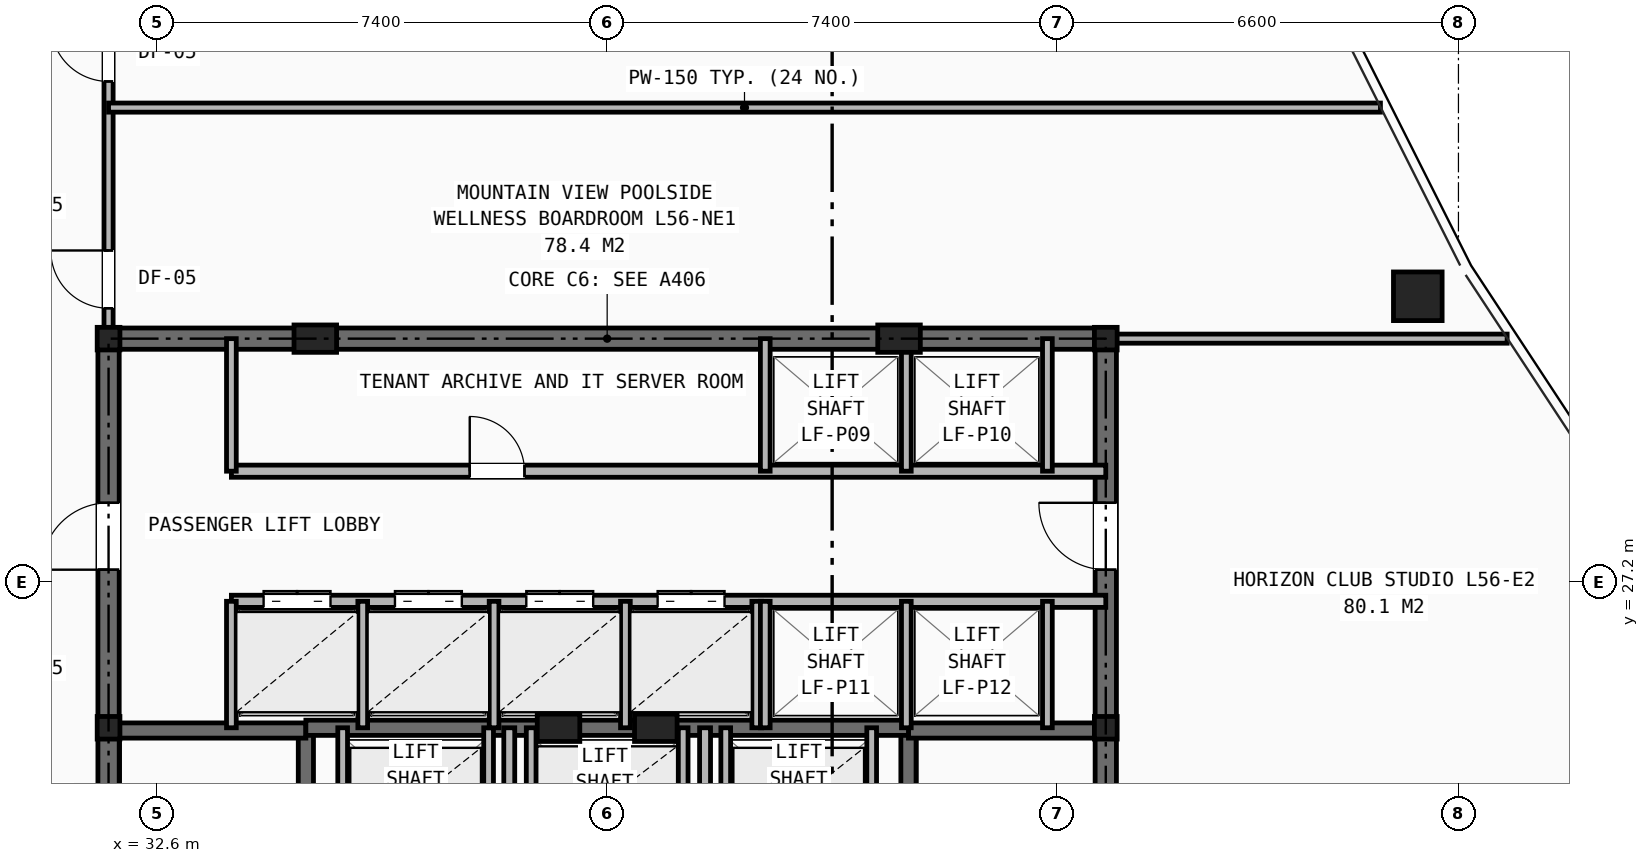
"""IFC4 building model, lengths in metres.
Left out: names, types, materials, properties, quantities, classifications, styles, units other than length and angle.
Written with IfcOpenShell. Run it as: python <this file> out.ifc"""

import sys

from ifc_helpers import new_model, si_unit, direction, frame, frame_2d, origin, origin_2d, place, context, subcontext, project, spatial, rectangle, hollow_rectangle, i_section, extrude, element, fill, save


model = new_model("IFC4")
c1 = context("Model", 3, precision=1e-05, world=origin(), true_north=direction((0.0, 1.0)))
c2 = subcontext(c1, "Body", "Model", "MODEL_VIEW")
j1 = project(units=[si_unit("LENGTHUNIT", "METRE"), si_unit("PLANEANGLEUNIT", "RADIAN")], contexts=[c1])
p1 = place(None, origin())
s1 = spatial("IfcSite", under=j1, at=p1, CompositionType="ELEMENT")
p2 = place(p1, origin())
s2 = spatial("IfcBuilding", under=s1, at=p2, CompositionType="ELEMENT")
p3 = place(p2, frame((0.0, 0.0, 196.5)))
s3 = spatial("IfcBuildingStorey", under=s2, at=p3, CompositionType="ELEMENT", Elevation=196.5)
for number, where, z_axis, x_axis in (
    (1, (31.8, 24.8, 0.0), (0.0, 0.0, 1.0), (1.0, 0.0, 0.0)),
    (2, (48.2, 24.8, 0.0), (0.0, 0.0, 1.0), (1.0, 0.0, 0.0)),
    (3, (31.8, 31.2, 0.0), (0.0, 0.0, 1.0), (1.0, 0.0, 0.0)),
    (4, (48.2, 31.2, 0.0), (0.0, 0.0, 1.0), (1.0, 0.0, 0.0)),
):
    element("IfcColumn", number, at=place(p3, frame(where, z_axis=z_axis, x_axis=x_axis)), inside=s3, PredefinedType="COLUMN", context=c2, shape_type="SweptSolid", body=[
        extrude(i_section(OverallWidth=0.374, OverallDepth=0.372, WebThickness=0.016, FlangeThickness=0.026, at=origin_2d()), origin(), (0.0, 0.0, 1.0), 4.2),
    ])
for number, where, z_axis, x_axis in (
    (5, (35.2, 31.2, 0.0), (0.0, 0.0, 1.0), (1.0, 0.0, 0.0)),
    (6, (44.8, 31.2, 0.0), (0.0, 0.0, 1.0), (1.0, 0.0, 0.0)),
    (7, (39.2, 24.8, 0.0), (0.0, 0.0, 1.0), (1.0, 0.0, 0.0)),
    (8, (40.8, 24.8, 0.0), (0.0, 0.0, 1.0), (1.0, 0.0, 0.0)),
):
    element("IfcColumn", number, at=place(p3, frame(where, z_axis=z_axis, x_axis=x_axis)), inside=s3, PredefinedType="PILASTER", context=c2, shape_type="SweptSolid", body=[
        extrude(rectangle(XDim=0.7, YDim=0.45, at=origin_2d()), origin(), (0.0, 0.0, 1.0), 4.2),
    ])
p4 = place(p3, frame((53.331, 31.897, 0.0), z_axis=(0.0, 0.0, 1.0), x_axis=(1.0, 0.0, 0.0)))
e9 = element("IfcColumn", 9, at=p4, inside=s3, PredefinedType="COLUMN", context=c2, shape_type="SweptSolid", body=[
    extrude(hollow_rectangle(XDim=0.8, YDim=0.8, WallThickness=0.055, at=origin_2d()), origin(), (0.0, 0.0, 1.0), 4.2),
])
p5 = place(p3, frame((31.8, 31.2, 0.0), z_axis=(0.0, 0.0, 1.0), x_axis=(1.0, 0.0, 0.0)))
e10 = element("IfcWall", 10, at=p5, inside=s3, PredefinedType="SHEAR", context=c2, shape_type="SweptSolid", body=[
    extrude(rectangle(XDim=16.4, YDim=0.35, at=frame_2d((8.2, 0.0))), origin(), (0.0, 0.0, 1.0), 3.94),
])
p6 = place(p3, frame((31.8, 16.4, 0.0), z_axis=(0.0, 0.0, 1.0), x_axis=(0.0, 1.0, 0.0)))
e11 = element("IfcWall", 11, at=p6, inside=s3, PredefinedType="SHEAR", context=c2, shape_type="SweptSolid", body=[
    extrude(rectangle(XDim=14.8, YDim=0.35, at=frame_2d((7.4, 0.0))), origin(), (0.0, 0.0, 1.0), 3.94),
])
p7 = place(p6, frame((11.0, 0.0, 0.0)))
e12 = element("IfcOpeningElement", 12, at=p7, cuts=e11, PredefinedType="OPENING", context=c2, shape_type="SweptSolid", body=[
    extrude(rectangle(XDim=1.1, YDim=2.15, at=frame_2d((0.55, 1.075))), frame((0.0, 0.185, 0.0), z_axis=(0.0, -1.0, 0.0), x_axis=(1.0, 0.0, 0.0)), (0.0, 0.0, 1.0), 0.37),
])
p8 = place(p3, frame((48.2, 16.4, 0.0), z_axis=(0.0, 0.0, 1.0), x_axis=(0.0, 1.0, 0.0)))
e13 = element("IfcWall", 13, at=p8, inside=s3, PredefinedType="SHEAR", context=c2, shape_type="SweptSolid", body=[
    extrude(rectangle(XDim=14.8, YDim=0.35, at=frame_2d((7.4, 0.0))), origin(), (0.0, 0.0, 1.0), 3.94),
])
p9 = place(p8, frame((11.0, 0.0, 0.0)))
e14 = element("IfcOpeningElement", 14, at=p9, cuts=e13, PredefinedType="OPENING", context=c2, shape_type="SweptSolid", body=[
    extrude(rectangle(XDim=1.1, YDim=2.15, at=frame_2d((0.55, 1.075))), frame((0.0, 0.185, 0.0), z_axis=(0.0, -1.0, 0.0), x_axis=(1.0, 0.0, 0.0)), (0.0, 0.0, 1.0), 0.37),
])
p10 = place(p3, frame((35.045, 16.4, 0.0), z_axis=(0.0, 0.0, 1.0), x_axis=(0.0, 1.0, 0.0)))
e15 = element("IfcWall", 15, at=p10, inside=s3, PredefinedType="SHEAR", context=c2, shape_type="SweptSolid", body=[
    extrude(rectangle(XDim=8.4, YDim=0.25, at=frame_2d((4.2, 0.0))), origin(), (0.0, 0.0, 1.0), 3.94),
])
p11 = place(p10, frame((0.45, 0.0, 0.0)))
e16 = element("IfcOpeningElement", 16, at=p11, cuts=e15, PredefinedType="OPENING", context=c2, shape_type="SweptSolid", body=[
    extrude(rectangle(XDim=0.95, YDim=2.1, at=frame_2d((0.475, 1.05))), frame((0.0, 0.135, 0.0), z_axis=(0.0, -1.0, 0.0), x_axis=(1.0, 0.0, 0.0)), (0.0, 0.0, 1.0), 0.27),
])
p12 = place(p3, frame((31.8, 24.755, 0.0), z_axis=(0.0, 0.0, 1.0), x_axis=(1.0, 0.0, 0.0)))
e17 = element("IfcWall", 17, at=p12, inside=s3, PredefinedType="SHEAR", context=c2, shape_type="SweptSolid", body=[
    extrude(rectangle(XDim=3.245, YDim=0.25, at=frame_2d((1.623, 0.0))), origin(), (0.0, 0.0, 1.0), 3.94),
])
p13 = place(p3, frame((44.955, 16.4, 0.0), z_axis=(0.0, 0.0, 1.0), x_axis=(0.0, 1.0, 0.0)))
e18 = element("IfcWall", 18, at=p13, inside=s3, PredefinedType="SHEAR", context=c2, shape_type="SweptSolid", body=[
    extrude(rectangle(XDim=8.4, YDim=0.25, at=frame_2d((4.2, 0.0))), origin(), (0.0, 0.0, 1.0), 3.94),
])
p14 = place(p13, frame((0.45, 0.0, 0.0)))
e19 = element("IfcOpeningElement", 19, at=p14, cuts=e18, PredefinedType="OPENING", context=c2, shape_type="SweptSolid", body=[
    extrude(rectangle(XDim=0.95, YDim=2.1, at=frame_2d((0.475, 1.05))), frame((0.0, 0.135, 0.0), z_axis=(0.0, -1.0, 0.0), x_axis=(1.0, 0.0, 0.0)), (0.0, 0.0, 1.0), 0.27),
])
p15 = place(p3, frame((44.955, 24.755, 0.0), z_axis=(0.0, 0.0, 1.0), x_axis=(1.0, 0.0, 0.0)))
e20 = element("IfcWall", 20, at=p15, inside=s3, PredefinedType="SHEAR", context=c2, shape_type="SweptSolid", body=[
    extrude(rectangle(XDim=3.245, YDim=0.25, at=frame_2d((1.623, 0.0))), origin(), (0.0, 0.0, 1.0), 3.94),
])
p16 = place(p3, frame((35.045, 24.8, 0.0), z_axis=(0.0, 0.0, 1.0), x_axis=(1.0, 0.0, 0.0)))
e21 = element("IfcWall", 21, at=p16, inside=s3, PredefinedType="SHEAR", context=c2, shape_type="SweptSolid", body=[
    extrude(rectangle(XDim=9.91, YDim=0.25, at=frame_2d((4.955, 0.0))), origin(), (0.0, 0.0, 1.0), 3.94),
])
p17 = place(p3, frame((38.39, 16.4, 0.0), z_axis=(0.0, 0.0, 1.0), x_axis=(0.0, 1.0, 0.0)))
e22 = element("IfcWall", 22, at=p17, inside=s3, PredefinedType="PARTITIONING", context=c2, shape_type="SweptSolid", body=[
    extrude(rectangle(XDim=8.4, YDim=0.18, at=frame_2d((4.2, 0.0))), origin(), (0.0, 0.0, 1.0), 3.395),
])
p18 = place(p17, frame((1.8, 0.0, 0.0)))
e23 = element("IfcOpeningElement", 23, at=p18, cuts=e22, PredefinedType="OPENING", context=c2, shape_type="SweptSolid", body=[
    extrude(rectangle(XDim=0.85, YDim=2.05, at=frame_2d((0.425, 1.025))), frame((0.0, 0.1, 0.0), z_axis=(0.0, -1.0, 0.0), x_axis=(1.0, 0.0, 0.0)), (0.0, 0.0, 1.0), 0.2),
])
p19 = place(p17, frame((4.35, 0.0, 0.0)))
e24 = element("IfcOpeningElement", 24, at=p19, cuts=e22, PredefinedType="OPENING", context=c2, shape_type="SweptSolid", body=[
    extrude(rectangle(XDim=0.95, YDim=2.1, at=frame_2d((0.475, 1.05))), frame((0.0, 0.1, 0.0), z_axis=(0.0, -1.0, 0.0), x_axis=(1.0, 0.0, 0.0)), (0.0, 0.0, 1.0), 0.2),
])
p20 = place(p3, frame((41.61, 16.4, 0.0), z_axis=(0.0, 0.0, 1.0), x_axis=(0.0, 1.0, 0.0)))
e25 = element("IfcWall", 25, at=p20, inside=s3, PredefinedType="PARTITIONING", context=c2, shape_type="SweptSolid", body=[
    extrude(rectangle(XDim=8.4, YDim=0.18, at=frame_2d((4.2, 0.0))), origin(), (0.0, 0.0, 1.0), 3.395),
])
p21 = place(p20, frame((1.8, 0.0, 0.0)))
e26 = element("IfcOpeningElement", 26, at=p21, cuts=e25, PredefinedType="OPENING", context=c2, shape_type="SweptSolid", body=[
    extrude(rectangle(XDim=0.85, YDim=2.05, at=frame_2d((0.425, 1.025))), frame((0.0, 0.1, 0.0), z_axis=(0.0, -1.0, 0.0), x_axis=(1.0, 0.0, 0.0)), (0.0, 0.0, 1.0), 0.2),
])
for number, where, z_axis, x_axis in (
    (27, (35.65, 22.48, 0.0), (0.0, 0.0, 1.0), (0.0, 1.0, 0.0)),
    (28, (38.05, 22.48, 0.0), (0.0, 0.0, 1.0), (0.0, 1.0, 0.0)),
    (29, (41.95, 22.48, 0.0), (0.0, 0.0, 1.0), (0.0, 1.0, 0.0)),
    (30, (44.35, 22.48, 0.0), (0.0, 0.0, 1.0), (0.0, 1.0, 0.0)),
    (31, (38.75, 22.48, 0.0), (0.0, 0.0, 1.0), (0.0, 1.0, 0.0)),
    (32, (41.25, 22.48, 0.0), (0.0, 0.0, 1.0), (0.0, 1.0, 0.0)),
):
    element("IfcWall", number, at=place(p3, frame(where, z_axis=z_axis, x_axis=x_axis)), inside=s3, PredefinedType="SOLIDWALL", context=c2, shape_type="SweptSolid", body=[
        extrude(rectangle(XDim=2.32, YDim=0.16, at=frame_2d((1.16, 0.0))), origin(), (0.0, 0.0, 1.0), 3.94),
    ])
p22 = place(p3, frame((33.82, 29.02, 0.0), z_axis=(0.0, 0.0, 1.0), x_axis=(1.0, 0.0, 0.0)))
e33 = element("IfcWall", 33, at=p22, inside=s3, PredefinedType="SOLIDWALL", context=c2, shape_type="SweptSolid", body=[
    extrude(rectangle(XDim=14.38, YDim=0.2, at=frame_2d((7.19, 0.0))), origin(), (0.0, 0.0, 1.0), 3.395),
])
p23 = place(p22, frame((3.92, 0.0, 0.0)))
e34 = element("IfcOpeningElement", 34, at=p23, cuts=e33, PredefinedType="OPENING", context=c2, shape_type="SweptSolid", body=[
    extrude(rectangle(XDim=0.9, YDim=2.1, at=frame_2d((0.45, 1.05))), frame((0.0, 0.11, 0.0), z_axis=(0.0, -1.0, 0.0), x_axis=(1.0, 0.0, 0.0)), (0.0, 0.0, 1.0), 0.22),
])
p24 = place(p3, frame((33.82, 26.88, 0.0), z_axis=(0.0, 0.0, 1.0), x_axis=(1.0, 0.0, 0.0)))
e35 = element("IfcWall", 35, at=p24, inside=s3, PredefinedType="SOLIDWALL", context=c2, shape_type="SweptSolid", body=[
    extrude(rectangle(XDim=14.38, YDim=0.2, at=frame_2d((7.19, 0.0))), origin(), (0.0, 0.0, 1.0), 3.395),
])
p25 = place(p24, frame((0.53, 0.0, 0.0)))
e36 = element("IfcOpeningElement", 36, at=p25, cuts=e35, PredefinedType="OPENING", context=c2, shape_type="SweptSolid", body=[
    extrude(rectangle(XDim=1.1, YDim=2.15, at=frame_2d((0.55, 1.075))), frame((0.0, 0.11, 0.0), z_axis=(0.0, -1.0, 0.0), x_axis=(1.0, 0.0, 0.0)), (0.0, 0.0, 1.0), 0.22),
])
p26 = place(p24, frame((2.69, 0.0, 0.0)))
e37 = element("IfcOpeningElement", 37, at=p26, cuts=e35, PredefinedType="OPENING", context=c2, shape_type="SweptSolid", body=[
    extrude(rectangle(XDim=1.1, YDim=2.15, at=frame_2d((0.55, 1.075))), frame((0.0, 0.11, 0.0), z_axis=(0.0, -1.0, 0.0), x_axis=(1.0, 0.0, 0.0)), (0.0, 0.0, 1.0), 0.22),
])
p27 = place(p24, frame((4.85, 0.0, 0.0)))
e38 = element("IfcOpeningElement", 38, at=p27, cuts=e35, PredefinedType="OPENING", context=c2, shape_type="SweptSolid", body=[
    extrude(rectangle(XDim=1.1, YDim=2.15, at=frame_2d((0.55, 1.075))), frame((0.0, 0.11, 0.0), z_axis=(0.0, -1.0, 0.0), x_axis=(1.0, 0.0, 0.0)), (0.0, 0.0, 1.0), 0.22),
])
p28 = place(p24, frame((7.01, 0.0, 0.0)))
e39 = element("IfcOpeningElement", 39, at=p28, cuts=e35, PredefinedType="OPENING", context=c2, shape_type="SweptSolid", body=[
    extrude(rectangle(XDim=1.1, YDim=2.15, at=frame_2d((0.55, 1.075))), frame((0.0, 0.11, 0.0), z_axis=(0.0, -1.0, 0.0), x_axis=(1.0, 0.0, 0.0)), (0.0, 0.0, 1.0), 0.22),
])
p29 = place(p3, frame((33.82, 29.02, 0.0), z_axis=(0.0, 0.0, 1.0), x_axis=(0.0, 1.0, 0.0)))
e40 = element("IfcWall", 40, at=p29, inside=s3, PredefinedType="SOLIDWALL", context=c2, shape_type="SweptSolid", body=[
    extrude(rectangle(XDim=2.18, YDim=0.16, at=frame_2d((1.09, 0.0))), origin(), (0.0, 0.0, 1.0), 3.395),
])
for number, where, z_axis, x_axis in (
    (41, (33.82, 24.8, 0.0), (0.0, 0.0, 1.0), (0.0, 1.0, 0.0)),
    (42, (35.98, 24.8, 0.0), (0.0, 0.0, 1.0), (0.0, 1.0, 0.0)),
    (43, (38.14, 24.8, 0.0), (0.0, 0.0, 1.0), (0.0, 1.0, 0.0)),
    (44, (40.3, 24.8, 0.0), (0.0, 0.0, 1.0), (0.0, 1.0, 0.0)),
    (45, (42.46, 24.8, 0.0), (0.0, 0.0, 1.0), (0.0, 1.0, 0.0)),
):
    element("IfcWall", number, at=place(p3, frame(where, z_axis=z_axis, x_axis=x_axis)), inside=s3, PredefinedType="SOLIDWALL", context=c2, shape_type="SweptSolid", body=[
        extrude(rectangle(XDim=2.08, YDim=0.16, at=frame_2d((1.04, 0.0))), origin(), (0.0, 0.0, 1.0), 3.94),
    ])
for number, where, z_axis, x_axis in (
    (46, (42.6, 29.02, 0.0), (0.0, 0.0, 1.0), (0.0, 1.0, 0.0)),
    (47, (44.92, 29.02, 0.0), (0.0, 0.0, 1.0), (0.0, 1.0, 0.0)),
    (48, (47.24, 29.02, 0.0), (0.0, 0.0, 1.0), (0.0, 1.0, 0.0)),
):
    element("IfcWall", number, at=place(p3, frame(where, z_axis=z_axis, x_axis=x_axis)), inside=s3, PredefinedType="SOLIDWALL", context=c2, shape_type="SweptSolid", body=[
        extrude(rectangle(XDim=2.18, YDim=0.16, at=frame_2d((1.09, 0.0))), origin(), (0.0, 0.0, 1.0), 3.395),
    ])
for number, where, z_axis, x_axis in (
    (49, (42.6, 24.8, 0.0), (0.0, 0.0, 1.0), (0.0, 1.0, 0.0)),
    (50, (44.92, 24.8, 0.0), (0.0, 0.0, 1.0), (0.0, 1.0, 0.0)),
    (51, (47.24, 24.8, 0.0), (0.0, 0.0, 1.0), (0.0, 1.0, 0.0)),
):
    element("IfcWall", number, at=place(p3, frame(where, z_axis=z_axis, x_axis=x_axis)), inside=s3, PredefinedType="SOLIDWALL", context=c2, shape_type="SweptSolid", body=[
        extrude(rectangle(XDim=2.08, YDim=0.16, at=frame_2d((1.04, 0.0))), origin(), (0.0, 0.0, 1.0), 3.94),
    ])
p30 = place(p3, frame((31.8, 31.2, 0.0), z_axis=(0.0, 0.0, 1.0), x_axis=(0.0, 1.0, 0.0)))
e52 = element("IfcWall", 52, at=p30, inside=s3, PredefinedType="PARTITIONING", context=c2, shape_type="SweptSolid", body=[
    extrude(rectangle(XDim=5.3, YDim=0.15, at=frame_2d((2.65, 0.0))), origin(), (0.0, 0.0, 1.0), 2.955),
])
p31 = place(p30, frame((0.5, 0.0, 0.0)))
e53 = element("IfcOpeningElement", 53, at=p31, cuts=e52, PredefinedType="OPENING", context=c2, shape_type="SweptSolid", body=[
    extrude(rectangle(XDim=0.95, YDim=2.1, at=frame_2d((0.475, 1.05))), frame((0.0, 0.085, 0.0), z_axis=(0.0, -1.0, 0.0), x_axis=(1.0, 0.0, 0.0)), (0.0, 0.0, 1.0), 0.17),
])
p32 = place(p30, frame((4.23, 0.0, 0.0)))
e54 = element("IfcOpeningElement", 54, at=p32, cuts=e52, PredefinedType="OPENING", context=c2, shape_type="SweptSolid", body=[
    extrude(rectangle(XDim=0.95, YDim=2.1, at=frame_2d((0.475, 1.05))), frame((0.0, 0.085, 0.0), z_axis=(0.0, -1.0, 0.0), x_axis=(1.0, 0.0, 0.0)), (0.0, 0.0, 1.0), 0.17),
])
p33 = place(p3, frame((48.2, 31.2, 0.0), z_axis=(0.0, 0.0, 1.0), x_axis=(1.0, 0.0, 0.0)))
e55 = element("IfcWall", 55, at=p33, inside=s3, PredefinedType="PARTITIONING", context=c2, shape_type="SweptSolid", body=[
    extrude(rectangle(XDim=6.601, YDim=0.15, at=frame_2d((3.3, 0.0))), origin(), (0.0, 0.0, 1.0), 2.955),
])
p34 = place(p3, frame((31.8, 35.0, 0.0), z_axis=(0.0, 0.0, 1.0), x_axis=(1.0, 0.0, 0.0)))
e56 = element("IfcWall", 56, at=p34, inside=s3, PredefinedType="PARTITIONING", context=c2, shape_type="SweptSolid", body=[
    extrude(rectangle(XDim=20.917, YDim=0.15, at=frame_2d((10.458, 0.0))), origin(), (0.0, 0.0, 1.0), 3.319),
])
p35 = place(p7, origin())
e57 = element("IfcDoor", 57, at=p35, inside=s3, OperationType="SINGLE_SWING_LEFT", PredefinedType="DOOR", context=c2, shape_type="SweptSolid", body=[
    extrude(rectangle(XDim=1.1, YDim=2.15, at=frame_2d((0.55, 1.075))), frame((0.0, 0.025, 0.0), z_axis=(0.0, -1.0, 0.0), x_axis=(1.0, 0.0, 0.0)), (0.0, 0.0, 1.0), 0.05),
])
fill(e12, e57)
p36 = place(p9, origin())
e58 = element("IfcDoor", 58, at=p36, inside=s3, OperationType="SINGLE_SWING_RIGHT", PredefinedType="DOOR", context=c2, shape_type="SweptSolid", body=[
    extrude(rectangle(XDim=1.1, YDim=2.15, at=frame_2d((0.55, 1.075))), frame((0.0, 0.025, 0.0), z_axis=(0.0, -1.0, 0.0), x_axis=(1.0, 0.0, 0.0)), (0.0, 0.0, 1.0), 0.05),
])
fill(e14, e58)
p37 = place(p23, origin())
e59 = element("IfcDoor", 59, at=p37, inside=s3, OperationType="SINGLE_SWING_LEFT", PredefinedType="DOOR", context=c2, shape_type="SweptSolid", body=[
    extrude(rectangle(XDim=0.9, YDim=2.1, at=frame_2d((0.45, 1.05))), frame((0.0, 0.025, 0.0), z_axis=(0.0, -1.0, 0.0), x_axis=(1.0, 0.0, 0.0)), (0.0, 0.0, 1.0), 0.05),
])
fill(e34, e59)
p38 = place(p25, origin())
e60 = element("IfcDoor", 60, at=p38, inside=s3, OperationType="DOUBLE_DOOR_SLIDING", PredefinedType="DOOR", context=c2, shape_type="SweptSolid", body=[
    extrude(rectangle(XDim=1.1, YDim=2.15, at=frame_2d((0.55, 1.075))), frame((0.0, 0.025, 0.0), z_axis=(0.0, -1.0, 0.0), x_axis=(1.0, 0.0, 0.0)), (0.0, 0.0, 1.0), 0.05),
])
fill(e36, e60)
p39 = place(p26, origin())
e61 = element("IfcDoor", 61, at=p39, inside=s3, OperationType="DOUBLE_DOOR_SLIDING", PredefinedType="DOOR", context=c2, shape_type="SweptSolid", body=[
    extrude(rectangle(XDim=1.1, YDim=2.15, at=frame_2d((0.55, 1.075))), frame((0.0, 0.025, 0.0), z_axis=(0.0, -1.0, 0.0), x_axis=(1.0, 0.0, 0.0)), (0.0, 0.0, 1.0), 0.05),
])
fill(e37, e61)
p40 = place(p27, origin())
e62 = element("IfcDoor", 62, at=p40, inside=s3, OperationType="DOUBLE_DOOR_SLIDING", PredefinedType="DOOR", context=c2, shape_type="SweptSolid", body=[
    extrude(rectangle(XDim=1.1, YDim=2.15, at=frame_2d((0.55, 1.075))), frame((0.0, 0.025, 0.0), z_axis=(0.0, -1.0, 0.0), x_axis=(1.0, 0.0, 0.0)), (0.0, 0.0, 1.0), 0.05),
])
fill(e38, e62)
p41 = place(p28, origin())
e63 = element("IfcDoor", 63, at=p41, inside=s3, OperationType="DOUBLE_DOOR_SLIDING", PredefinedType="DOOR", context=c2, shape_type="SweptSolid", body=[
    extrude(rectangle(XDim=1.1, YDim=2.15, at=frame_2d((0.55, 1.075))), frame((0.0, 0.025, 0.0), z_axis=(0.0, -1.0, 0.0), x_axis=(1.0, 0.0, 0.0)), (0.0, 0.0, 1.0), 0.05),
])
fill(e39, e63)
p42 = place(p31, origin())
e64 = element("IfcDoor", 64, at=p42, inside=s3, OperationType="SINGLE_SWING_RIGHT", PredefinedType="DOOR", context=c2, shape_type="SweptSolid", body=[
    extrude(rectangle(XDim=0.95, YDim=2.1, at=frame_2d((0.475, 1.05))), frame((0.0, 0.025, 0.0), z_axis=(0.0, -1.0, 0.0), x_axis=(1.0, 0.0, 0.0)), (0.0, 0.0, 1.0), 0.05),
])
fill(e53, e64)
p43 = place(p32, origin())
e65 = element("IfcDoor", 65, at=p43, inside=s3, OperationType="SINGLE_SWING_RIGHT", PredefinedType="DOOR", context=c2, shape_type="SweptSolid", body=[
    extrude(rectangle(XDim=0.95, YDim=2.1, at=frame_2d((0.475, 1.05))), frame((0.0, 0.025, 0.0), z_axis=(0.0, -1.0, 0.0), x_axis=(1.0, 0.0, 0.0)), (0.0, 0.0, 1.0), 0.05),
])
fill(e54, e65)
save(model, sys.argv[1])
